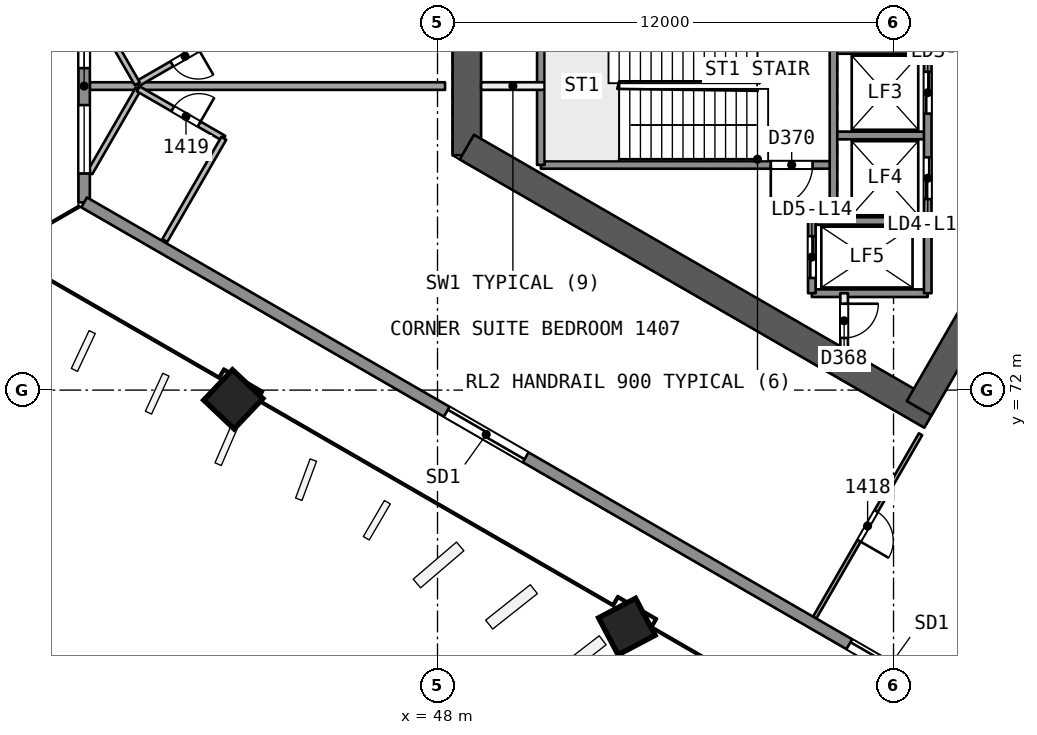
"""IFC4 building model, lengths in metres.
Left out: names, types, materials, properties, quantities, classifications, styles, units other than length and angle.
Written with IfcOpenShell. Run it as: python <this file> out.ifc"""

import sys

from ifc_helpers import new_model, si_unit, direction, frame, frame_2d, origin, origin_2d, place, context, subcontext, project, spatial, rectangle, extrude, element, fill, save


model = new_model("IFC4")
c1 = context("Model", 3, precision=1e-05, world=origin(), true_north=direction((0.0, 1.0)))
c2 = subcontext(c1, "Body", "Model", "MODEL_VIEW")
j1 = project(units=[si_unit("LENGTHUNIT", "METRE"), si_unit("PLANEANGLEUNIT", "RADIAN")], contexts=[c1])
p1 = place(None, origin())
s1 = spatial("IfcSite", under=j1, at=p1, CompositionType="ELEMENT")
p2 = place(p1, origin())
s2 = spatial("IfcBuilding", under=s1, at=p2, CompositionType="ELEMENT")
p3 = place(p2, frame((0.0, 0.0, 64.7)))
s3 = spatial("IfcBuildingStorey", under=s2, at=p3, CompositionType="ELEMENT", Elevation=64.7)
p4 = place(p3, frame((65.567, 80.0, 0.0), z_axis=(0.0, 0.0, 1.0), x_axis=(-0.499988615364, 0.866031976607, 0.0)))
e1 = element("IfcWall", 1, at=p4, inside=s3, PredefinedType="SHEAR", context=c2, shape_type="SweptSolid", body=[
    extrude(rectangle(XDim=10.163, YDim=0.75, at=frame_2d((5.082, 0.0))), origin(), (0.0, 0.0, 1.0), 3.7),
])
p5 = place(p4, frame((0.733, 0.0, 0.0)))
e2 = element("IfcOpeningElement", 2, at=p5, cuts=e1, PredefinedType="OPENING", context=c2, shape_type="SweptSolid", body=[
    extrude(rectangle(XDim=1.2, YDim=2.1, at=frame_2d((0.6, 1.05))), frame((0.0, 0.385, 0.0), z_axis=(0.0, -1.0, 0.0), x_axis=(1.0, 0.0, 0.0)), (0.0, 0.0, 1.0), 0.771),
])
p6 = place(p3, frame((48.772, 81.606, 0.0), z_axis=(0.0, 0.0, 1.0), x_axis=(0.0, -1.0, 0.0)))
e3 = element("IfcWall", 3, at=p6, inside=s3, PredefinedType="SHEAR", context=c2, shape_type="SweptSolid", body=[
    extrude(rectangle(XDim=3.429, YDim=0.75, at=frame_2d((1.714, 0.0))), origin(), (0.0, 0.0, 1.0), 3.7),
])
p7 = place(p3, frame((48.772, 78.394, 0.0), z_axis=(0.0, 0.0, 1.0), x_axis=(0.866028339916, -0.499994914436, 0.0)))
e4 = element("IfcWall", 4, at=p7, inside=s3, PredefinedType="SHEAR", context=c2, shape_type="SweptSolid", body=[
    extrude(rectangle(XDim=14.117, YDim=0.75, at=frame_2d((7.059, 0.0))), origin(), (0.0, 0.0, 1.0), 3.7),
])
p8 = place(p3, frame((60.673, 71.523, 0.0), z_axis=(0.0, 0.0, 1.0), x_axis=(0.499997052475, 0.866027105532, 0.0)))
e5 = element("IfcWall", 5, at=p8, inside=s3, PredefinedType="SHEAR", context=c2, shape_type="SweptSolid", body=[
    extrude(rectangle(XDim=10.005, YDim=0.75, at=frame_2d((5.002, 0.0))), origin(), (0.0, 0.0, 1.0), 3.7),
])
p9 = place(p8, frame((7.855, 0.0, 0.0)))
e6 = element("IfcOpeningElement", 6, at=p9, cuts=e5, PredefinedType="OPENING", context=c2, shape_type="SweptSolid", body=[
    extrude(rectangle(XDim=1.2, YDim=2.1, at=frame_2d((0.6, 1.05))), frame((0.0, 0.385, 0.0), z_axis=(0.0, -1.0, 0.0), x_axis=(1.0, 0.0, 0.0)), (0.0, 0.0, 1.0), 0.771),
])
p10 = place(p3, frame((42.593, 71.749, 0.0), z_axis=(0.02855911485, 0.006793507689, 0.999569019734), x_axis=(-0.865319840559, 0.500766443848, 0.021319996519)))
e7 = element("IfcColumn", 7, at=p10, inside=s3, PredefinedType="COLUMN", context=c2, shape_type="SweptSolid", body=[
    extrude(rectangle(XDim=1.1, YDim=1.1, at=origin_2d()), origin(), (0.0, 0.0, 1.0), 3.702),
])
p11 = place(p3, frame((52.959, 65.764, 0.0), z_axis=(0.019328501455, 0.012204002625, 0.999738701537), x_axis=(-0.866906106124, 0.498357109285, 0.010676834304)))
e8 = element("IfcColumn", 8, at=p11, inside=s3, PredefinedType="COLUMN", context=c2, shape_type="SweptSolid", body=[
    extrude(rectangle(XDim=1.1, YDim=1.1, at=origin_2d()), origin(), (0.0, 0.0, 1.0), 3.701),
])
p12 = place(p3, frame((42.352, 81.36, 0.0), z_axis=(0.0, 0.0, 1.0), x_axis=(-0.865997922154, -0.500047596559, 0.0)))
e9 = element("IfcWall", 9, at=p12, inside=s3, PredefinedType="PARTITIONING", context=c2, shape_type="SweptSolid", body=[
    extrude(rectangle(XDim=2.6, YDim=0.15, at=frame_2d((1.3, 0.0))), origin(), (0.0, 0.0, 1.0), 3.2),
])
p13 = place(p12, frame((0.75, 0.0, 0.0)))
e10 = element("IfcOpeningElement", 10, at=p13, cuts=e9, PredefinedType="OPENING", context=c2, shape_type="SweptSolid", body=[
    extrude(rectangle(XDim=0.8, YDim=2.1, at=frame_2d((0.4, 1.05))), frame((0.0, 0.085, 0.0), z_axis=(0.0, -1.0, 0.0), x_axis=(1.0, 0.0, 0.0)), (0.0, 0.0, 1.0), 0.171),
])
p14 = place(p3, frame((40.1, 80.06, 0.0), z_axis=(0.0, 0.0, 1.0), x_axis=(-0.499973274517, 0.866040833199, 0.0)))
e11 = element("IfcWall", 11, at=p14, inside=s3, PredefinedType="PARTITIONING", context=c2, shape_type="SweptSolid", body=[
    extrude(rectangle(XDim=2.5, YDim=0.15, at=frame_2d((1.25, 0.0))), origin(), (0.0, 0.0, 1.0), 3.2),
])
p15 = place(p3, frame((38.851, 80.0, 0.0), z_axis=(0.0, 0.0, 1.0), x_axis=(1.0, 0.0, 0.0)))
e12 = element("IfcWall", 12, at=p15, inside=s3, PredefinedType="PARTITIONING", context=c2, shape_type="SweptSolid", body=[
    extrude(rectangle(XDim=9.347, YDim=0.2, at=frame_2d((4.674, 0.0))), origin(), (0.0, 0.0, 1.0), 3.2),
])
p16 = place(p3, frame((60.71, 70.838, 0.0), z_axis=(0.0, 0.0, 1.0), x_axis=(-0.499994302092, -0.866028693448, 0.0)))
e13 = element("IfcWall", 13, at=p16, inside=s3, PredefinedType="PARTITIONING", context=c2, shape_type="SweptSolid", body=[
    extrude(rectangle(XDim=5.571, YDim=0.1, at=frame_2d((2.786, 0.0))), origin(), (0.0, 0.0, 1.0), 3.2),
])
p17 = place(p16, frame((2.336, 0.0, 0.0)))
e14 = element("IfcOpeningElement", 14, at=p17, cuts=e13, PredefinedType="OPENING", context=c2, shape_type="SweptSolid", body=[
    extrude(rectangle(XDim=0.9, YDim=2.1, at=frame_2d((0.45, 1.05))), frame((0.0, 0.061, 0.0), z_axis=(0.0, -1.0, 0.0), x_axis=(1.0, 0.0, 0.0)), (0.0, 0.0, 1.0), 0.121),
])
p18 = place(p3, frame((38.851, 77.718, 0.0), z_axis=(0.0, 0.0, 1.0), x_axis=(0.499960079661, 0.866048450576, 0.0)))
e15 = element("IfcWall", 15, at=p18, inside=s3, PredefinedType="PARTITIONING", context=c2, shape_type="SweptSolid", body=[
    extrude(rectangle(XDim=2.55, YDim=0.15, at=frame_2d((1.275, 0.0))), origin(), (0.0, 0.0, 1.0), 3.2),
])
p19 = place(p3, frame((40.125, 79.926, 0.0), z_axis=(0.0, 0.0, 1.0), x_axis=(0.866062058628, -0.499936506574, 0.0)))
e16 = element("IfcWall", 16, at=p19, inside=s3, PredefinedType="PARTITIONING", context=c2, shape_type="SweptSolid", body=[
    extrude(rectangle(XDim=2.6, YDim=0.15, at=frame_2d((1.3, 0.0))), origin(), (0.0, 0.0, 1.0), 3.2),
])
p20 = place(p19, frame((1.05, 0.0, 0.0)))
e17 = element("IfcOpeningElement", 17, at=p20, cuts=e16, PredefinedType="OPENING", context=c2, shape_type="SweptSolid", body=[
    extrude(rectangle(XDim=0.8, YDim=2.1, at=frame_2d((0.4, 1.05))), frame((0.0, 0.085, 0.0), z_axis=(0.0, -1.0, 0.0), x_axis=(1.0, 0.0, 0.0)), (0.0, 0.0, 1.0), 0.171),
])
p21 = place(p3, frame((42.377, 78.626, 0.0), z_axis=(0.0, 0.0, 1.0), x_axis=(-0.499983108224, -0.866035156036, 0.0)))
e18 = element("IfcWall", 18, at=p21, inside=s3, PredefinedType="PARTITIONING", context=c2, shape_type="SweptSolid", body=[
    extrude(rectangle(XDim=3.108, YDim=0.15, at=frame_2d((1.554, 0.0))), origin(), (0.0, 0.0, 1.0), 3.2),
])
p22 = place(p3, frame((38.701, 76.94, 0.0), z_axis=(0.0, 0.0, 1.0), x_axis=(0.0, 1.0, 0.0)))
e19 = element("IfcWall", 19, at=p22, inside=s3, PredefinedType="SOLIDWALL", context=c2, shape_type="SweptSolid", body=[
    extrude(rectangle(XDim=6.121, YDim=0.3, at=frame_2d((3.06, 0.0))), origin(), (0.0, 0.0, 1.0), 3.2),
])
p23 = place(p22, frame((3.532, 0.0, 0.9)))
e20 = element("IfcOpeningElement", 20, at=p23, cuts=e19, PredefinedType="OPENING", context=c2, shape_type="SweptSolid", body=[
    extrude(rectangle(XDim=1.8, YDim=1.5, at=frame_2d((0.9, 0.75))), frame((0.0, 0.161, 0.0), z_axis=(0.0, -1.0, 0.0), x_axis=(1.0, 0.0, 0.0)), (0.0, 0.0, 1.0), 0.321),
])
p24 = place(p22, frame((0.76, 0.0, 0.9)))
e21 = element("IfcOpeningElement", 21, at=p24, cuts=e19, PredefinedType="OPENING", context=c2, shape_type="SweptSolid", body=[
    extrude(rectangle(XDim=1.8, YDim=1.5, at=frame_2d((0.9, 0.75))), frame((0.0, 0.161, 0.0), z_axis=(0.0, -1.0, 0.0), x_axis=(1.0, 0.0, 0.0)), (0.0, 0.0, 1.0), 0.321),
])
p25 = place(p3, frame((90.499, 47.034, 0.0), z_axis=(0.0, 0.0, 1.0), x_axis=(-0.866026049211, 0.499998882086, 0.0)))
e22 = element("IfcWall", 22, at=p25, inside=s3, PredefinedType="SOLIDWALL", context=c2, shape_type="SweptSolid", body=[
    extrude(rectangle(XDim=59.811, YDim=0.3, at=frame_2d((29.905, 0.0))), origin(), (0.0, 0.0, 1.0), 3.2),
])
p26 = place(p25, frame((28.705, 0.0, 0.0)))
e23 = element("IfcOpeningElement", 23, at=p26, cuts=e22, PredefinedType="OPENING", context=c2, shape_type="SweptSolid", body=[
    extrude(rectangle(XDim=2.4, YDim=2.4, at=frame_2d((1.2, 1.2))), frame((0.0, 0.161, 0.0), z_axis=(0.0, -1.0, 0.0), x_axis=(1.0, 0.0, 0.0)), (0.0, 0.0, 1.0), 0.321),
])
p27 = place(p25, frame((34.161, 0.0, 0.0)))
e24 = element("IfcOpeningElement", 24, at=p27, cuts=e22, PredefinedType="OPENING", context=c2, shape_type="SweptSolid", body=[
    extrude(rectangle(XDim=2.4, YDim=2.4, at=frame_2d((1.2, 1.2))), frame((0.0, 0.161, 0.0), z_axis=(0.0, -1.0, 0.0), x_axis=(1.0, 0.0, 0.0)), (0.0, 0.0, 1.0), 0.321),
])
p28 = place(p25, frame((46.394, 0.0, 0.0)))
e25 = element("IfcOpeningElement", 25, at=p28, cuts=e22, PredefinedType="OPENING", context=c2, shape_type="SweptSolid", body=[
    extrude(rectangle(XDim=2.4, YDim=2.4, at=frame_2d((1.2, 1.2))), frame((0.0, 0.161, 0.0), z_axis=(0.0, -1.0, 0.0), x_axis=(1.0, 0.0, 0.0)), (0.0, 0.0, 1.0), 0.321),
])
p29 = place(p25, frame((23.249, 0.0, 0.0)))
e26 = element("IfcOpeningElement", 26, at=p29, cuts=e22, PredefinedType="OPENING", context=c2, shape_type="SweptSolid", body=[
    extrude(rectangle(XDim=2.4, YDim=2.4, at=frame_2d((1.2, 1.2))), frame((0.0, 0.161, 0.0), z_axis=(0.0, -1.0, 0.0), x_axis=(1.0, 0.0, 0.0)), (0.0, 0.0, 1.0), 0.321),
])
p30 = place(p25, frame((11.002, 0.0, 0.0)))
e27 = element("IfcOpeningElement", 27, at=p30, cuts=e22, PredefinedType="OPENING", context=c2, shape_type="SweptSolid", body=[
    extrude(rectangle(XDim=2.4, YDim=2.4, at=frame_2d((1.2, 1.2))), frame((0.0, 0.161, 0.0), z_axis=(0.0, -1.0, 0.0), x_axis=(1.0, 0.0, 0.0)), (0.0, 0.0, 1.0), 0.321),
])
p31 = place(p3, frame((60.9, 80.95, 0.0), z_axis=(0.0, 0.0, 1.0), x_axis=(-1.0, 0.0, 0.0)))
e28 = element("IfcWall", 28, at=p31, inside=s3, PredefinedType="SOLIDWALL", context=c2, shape_type="SweptSolid", body=[
    extrude(rectangle(XDim=2.48, YDim=0.2, at=frame_2d((1.24, 0.0))), origin(), (0.0, 0.0, 1.0), 3.2),
])
p32 = place(p3, frame((50.82, 80.0, 0.0), z_axis=(0.0, 0.0, 1.0), x_axis=(-1.0, 0.0, 0.0)))
e29 = element("IfcWall", 29, at=p32, inside=s3, PredefinedType="PARTITIONING", context=c2, shape_type="SweptSolid", body=[
    extrude(rectangle(XDim=1.673, YDim=0.2, at=frame_2d((0.836, 0.0))), origin(), (0.0, 0.0, 1.0), 3.2),
])
p33 = place(p3, frame((60.9, 78.7, 0.0), z_axis=(0.0, 0.0, 1.0), x_axis=(-1.0, 0.0, 0.0)))
e30 = element("IfcWall", 30, at=p33, inside=s3, PredefinedType="SOLIDWALL", context=c2, shape_type="SweptSolid", body=[
    extrude(rectangle(XDim=2.48, YDim=0.2, at=frame_2d((1.24, 0.0))), origin(), (0.0, 0.0, 1.0), 3.2),
])
p34 = place(p3, frame((58.42, 77.925, 0.0), z_axis=(0.0, 0.0, 1.0), x_axis=(-1.0, 0.0, 0.0)))
e31 = element("IfcWall", 31, at=p34, inside=s3, PredefinedType="SOLIDWALL", context=c2, shape_type="SweptSolid", body=[
    extrude(rectangle(XDim=7.7, YDim=0.2, at=frame_2d((3.85, 0.0))), origin(), (0.0, 0.0, 1.0), 3.2),
])
p35 = place(p34, frame((0.55, 0.0, 0.0)))
e32 = element("IfcOpeningElement", 32, at=p35, cuts=e31, PredefinedType="OPENING", context=c2, shape_type="SweptSolid", body=[
    extrude(rectangle(XDim=1.1, YDim=2.1, at=frame_2d((0.55, 1.05))), frame((0.0, 0.11, 0.0), z_axis=(0.0, -1.0, 0.0), x_axis=(1.0, 0.0, 0.0)), (0.0, 0.0, 1.0), 0.221),
])
for number, where, z_axis, x_axis in (
    (33, (60.9, 76.45, 0.0), (0.0, 0.0, 1.0), (-1.0, 0.0, 0.0)),
    (34, (60.9, 74.55, 0.0), (0.0, 0.0, 1.0), (-1.0, 0.0, 0.0)),
):
    element("IfcWall", number, at=place(p3, frame(where, z_axis=z_axis, x_axis=x_axis)), inside=s3, PredefinedType="SOLIDWALL", context=c2, shape_type="SweptSolid", body=[
        extrude(rectangle(XDim=3.05, YDim=0.2, at=frame_2d((1.525, 0.0))), origin(), (0.0, 0.0, 1.0), 3.2),
    ])
p36 = place(p3, frame((60.9, 85.45, 0.0), z_axis=(0.0, 0.0, 1.0), x_axis=(0.0, -1.0, 0.0)))
e35 = element("IfcWall", 35, at=p36, inside=s3, PredefinedType="SOLIDWALL", context=c2, shape_type="SweptSolid", body=[
    extrude(rectangle(XDim=10.9, YDim=0.2, at=frame_2d((5.45, 0.0))), origin(), (0.0, 0.0, 1.0), 3.2),
])
p37 = place(p36, frame((0.575, 0.0, 0.0)))
e36 = element("IfcOpeningElement", 36, at=p37, cuts=e35, PredefinedType="OPENING", context=c2, shape_type="SweptSolid", body=[
    extrude(rectangle(XDim=1.1, YDim=2.1, at=frame_2d((0.55, 1.05))), frame((0.0, 0.11, 0.0), z_axis=(0.0, -1.0, 0.0), x_axis=(1.0, 0.0, 0.0)), (0.0, 0.0, 1.0), 0.221),
])
p38 = place(p36, frame((2.825, 0.0, 0.0)))
e37 = element("IfcOpeningElement", 37, at=p38, cuts=e35, PredefinedType="OPENING", context=c2, shape_type="SweptSolid", body=[
    extrude(rectangle(XDim=1.1, YDim=2.1, at=frame_2d((0.55, 1.05))), frame((0.0, 0.11, 0.0), z_axis=(0.0, -1.0, 0.0), x_axis=(1.0, 0.0, 0.0)), (0.0, 0.0, 1.0), 0.221),
])
p39 = place(p36, frame((5.075, 0.0, 0.0)))
e38 = element("IfcOpeningElement", 38, at=p39, cuts=e35, PredefinedType="OPENING", context=c2, shape_type="SweptSolid", body=[
    extrude(rectangle(XDim=1.1, YDim=2.1, at=frame_2d((0.55, 1.05))), frame((0.0, 0.11, 0.0), z_axis=(0.0, -1.0, 0.0), x_axis=(1.0, 0.0, 0.0)), (0.0, 0.0, 1.0), 0.221),
])
p40 = place(p36, frame((7.325, 0.0, 0.0)))
e39 = element("IfcOpeningElement", 39, at=p40, cuts=e35, PredefinedType="OPENING", context=c2, shape_type="SweptSolid", body=[
    extrude(rectangle(XDim=1.1, YDim=2.1, at=frame_2d((0.55, 1.05))), frame((0.0, 0.11, 0.0), z_axis=(0.0, -1.0, 0.0), x_axis=(1.0, 0.0, 0.0)), (0.0, 0.0, 1.0), 0.221),
])
p41 = place(p3, frame((58.7, 74.55, 0.0), z_axis=(0.0, 0.0, 1.0), x_axis=(0.0, -1.0, 0.0)))
e40 = element("IfcWall", 40, at=p41, inside=s3, PredefinedType="PARTITIONING", context=c2, shape_type="SweptSolid", body=[
    extrude(rectangle(XDim=1.455, YDim=0.2, at=frame_2d((0.728, 0.0))), origin(), (0.0, 0.0, 1.0), 3.2),
])
p42 = place(p41, frame((0.278, 0.0, 0.0)))
e41 = element("IfcOpeningElement", 41, at=p42, cuts=e40, PredefinedType="OPENING", context=c2, shape_type="SweptSolid", body=[
    extrude(rectangle(XDim=0.9, YDim=2.1, at=frame_2d((0.45, 1.05))), frame((0.0, 0.11, 0.0), z_axis=(0.0, -1.0, 0.0), x_axis=(1.0, 0.0, 0.0)), (0.0, 0.0, 1.0), 0.221),
])
p43 = place(p3, frame((58.42, 85.45, 0.0), z_axis=(0.0, 0.0, 1.0), x_axis=(0.0, -1.0, 0.0)))
e42 = element("IfcWall", 42, at=p43, inside=s3, PredefinedType="SOLIDWALL", context=c2, shape_type="SweptSolid", body=[
    extrude(rectangle(XDim=9.0, YDim=0.2, at=frame_2d((4.5, 0.0))), origin(), (0.0, 0.0, 1.0), 3.2),
])
p44 = place(p3, frame((57.85, 76.45, 0.0), z_axis=(0.0, 0.0, 1.0), x_axis=(0.0, -1.0, 0.0)))
e43 = element("IfcWall", 43, at=p44, inside=s3, PredefinedType="SOLIDWALL", context=c2, shape_type="SweptSolid", body=[
    extrude(rectangle(XDim=1.9, YDim=0.2, at=frame_2d((0.95, 0.0))), origin(), (0.0, 0.0, 1.0), 3.2),
])
p45 = place(p44, frame((0.4, 0.0, 0.0)))
e44 = element("IfcOpeningElement", 44, at=p45, cuts=e43, PredefinedType="OPENING", context=c2, shape_type="SweptSolid", body=[
    extrude(rectangle(XDim=1.1, YDim=2.1, at=frame_2d((0.55, 1.05))), frame((0.0, 0.11, 0.0), z_axis=(0.0, -1.0, 0.0), x_axis=(1.0, 0.0, 0.0)), (0.0, 0.0, 1.0), 0.221),
])
p46 = place(p3, frame((50.72, 82.075, 0.0), z_axis=(0.0, 0.0, 1.0), x_axis=(0.0, -1.0, 0.0)))
e45 = element("IfcWall", 45, at=p46, inside=s3, PredefinedType="SOLIDWALL", context=c2, shape_type="SweptSolid", body=[
    extrude(rectangle(XDim=4.15, YDim=0.2, at=frame_2d((2.075, 0.0))), origin(), (0.0, 0.0, 1.0), 3.2),
])
p47 = place(p13, origin())
e46 = element("IfcDoor", 46, at=p47, inside=s3, OperationType="SINGLE_SWING_LEFT", PredefinedType="NOTDEFINED", context=c2, shape_type="SweptSolid", body=[
    extrude(rectangle(XDim=0.8, YDim=2.1, at=frame_2d((0.4, 1.05))), frame((0.0, 0.025, 0.0), z_axis=(0.0, -1.0, 0.0), x_axis=(1.0, 0.0, 0.0)), (0.0, 0.0, 1.0), 0.05),
])
fill(e10, e46)
p48 = place(p17, origin())
e47 = element("IfcDoor", 47, at=p48, inside=s3, OperationType="SINGLE_SWING_RIGHT", PredefinedType="NOTDEFINED", context=c2, shape_type="SweptSolid", body=[
    extrude(rectangle(XDim=0.9, YDim=2.1, at=frame_2d((0.45, 1.05))), frame((0.0, 0.025, 0.0), z_axis=(0.0, -1.0, 0.0), x_axis=(1.0, 0.0, 0.0)), (0.0, 0.0, 1.0), 0.05),
])
fill(e14, e47)
p49 = place(p20, origin())
e48 = element("IfcDoor", 48, at=p49, inside=s3, OperationType="SINGLE_SWING_RIGHT", PredefinedType="NOTDEFINED", context=c2, shape_type="SweptSolid", body=[
    extrude(rectangle(XDim=0.8, YDim=2.1, at=frame_2d((0.4, 1.05))), frame((0.0, 0.025, 0.0), z_axis=(0.0, -1.0, 0.0), x_axis=(1.0, 0.0, 0.0)), (0.0, 0.0, 1.0), 0.05),
])
fill(e17, e48)
p50 = place(p23, origin())
e49 = element("IfcWindow", 49, at=p50, inside=s3, PartitioningType="SINGLE_PANEL", PredefinedType="WINDOW", context=c2, shape_type="SweptSolid", body=[
    extrude(rectangle(XDim=1.8, YDim=1.5, at=frame_2d((0.9, 0.75))), frame((0.0, 0.03, 0.0), z_axis=(0.0, -1.0, 0.0), x_axis=(1.0, 0.0, 0.0)), (0.0, 0.0, 1.0), 0.06),
])
fill(e20, e49)
p51 = place(p24, origin())
e50 = element("IfcWindow", 50, at=p51, inside=s3, PartitioningType="SINGLE_PANEL", PredefinedType="WINDOW", context=c2, shape_type="SweptSolid", body=[
    extrude(rectangle(XDim=1.8, YDim=1.5, at=frame_2d((0.9, 0.75))), frame((0.0, 0.03, 0.0), z_axis=(0.0, -1.0, 0.0), x_axis=(1.0, 0.0, 0.0)), (0.0, 0.0, 1.0), 0.06),
])
fill(e21, e50)
p52 = place(p27, origin())
e51 = element("IfcDoor", 51, at=p52, inside=s3, OperationType="SLIDING_TO_RIGHT", PredefinedType="NOTDEFINED", context=c2, shape_type="SweptSolid", body=[
    extrude(rectangle(XDim=2.4, YDim=2.4, at=frame_2d((1.2, 1.2))), frame((0.0, 0.025, 0.0), z_axis=(0.0, -1.0, 0.0), x_axis=(1.0, 0.0, 0.0)), (0.0, 0.0, 1.0), 0.05),
])
fill(e24, e51)
p53 = place(p28, origin())
e52 = element("IfcDoor", 52, at=p53, inside=s3, OperationType="SLIDING_TO_LEFT", PredefinedType="NOTDEFINED", context=c2, shape_type="SweptSolid", body=[
    extrude(rectangle(XDim=2.4, YDim=2.4, at=frame_2d((1.2, 1.2))), frame((0.0, 0.025, 0.0), z_axis=(0.0, -1.0, 0.0), x_axis=(1.0, 0.0, 0.0)), (0.0, 0.0, 1.0), 0.05),
])
fill(e25, e52)
p54 = place(p39, origin())
e53 = element("IfcDoor", 53, at=p54, inside=s3, OperationType="SLIDING_TO_RIGHT", PredefinedType="NOTDEFINED", context=c2, shape_type="SweptSolid", body=[
    extrude(rectangle(XDim=1.1, YDim=2.1, at=frame_2d((0.55, 1.05))), frame((0.0, 0.025, 0.0), z_axis=(0.0, -1.0, 0.0), x_axis=(1.0, 0.0, 0.0)), (0.0, 0.0, 1.0), 0.05),
])
fill(e38, e53)
p55 = place(p40, origin())
e54 = element("IfcDoor", 54, at=p55, inside=s3, OperationType="SLIDING_TO_LEFT", PredefinedType="NOTDEFINED", context=c2, shape_type="SweptSolid", body=[
    extrude(rectangle(XDim=1.1, YDim=2.1, at=frame_2d((0.55, 1.05))), frame((0.0, 0.025, 0.0), z_axis=(0.0, -1.0, 0.0), x_axis=(1.0, 0.0, 0.0)), (0.0, 0.0, 1.0), 0.05),
])
fill(e39, e54)
p56 = place(p45, origin())
e55 = element("IfcDoor", 55, at=p56, inside=s3, OperationType="SLIDING_TO_RIGHT", PredefinedType="NOTDEFINED", context=c2, shape_type="SweptSolid", body=[
    extrude(rectangle(XDim=1.1, YDim=2.1, at=frame_2d((0.55, 1.05))), frame((0.0, 0.025, 0.0), z_axis=(0.0, -1.0, 0.0), x_axis=(1.0, 0.0, 0.0)), (0.0, 0.0, 1.0), 0.05),
])
fill(e44, e55)
p57 = place(p42, origin())
e56 = element("IfcDoor", 56, at=p57, inside=s3, OperationType="SINGLE_SWING_LEFT", PredefinedType="NOTDEFINED", context=c2, shape_type="SweptSolid", body=[
    extrude(rectangle(XDim=0.9, YDim=2.1, at=frame_2d((0.45, 1.05))), frame((0.0, 0.025, 0.0), z_axis=(0.0, -1.0, 0.0), x_axis=(1.0, 0.0, 0.0)), (0.0, 0.0, 1.0), 0.05),
])
fill(e41, e56)
p58 = place(p35, origin())
e57 = element("IfcDoor", 57, at=p58, inside=s3, OperationType="SINGLE_SWING_RIGHT", PredefinedType="NOTDEFINED", context=c2, shape_type="SweptSolid", body=[
    extrude(rectangle(XDim=1.1, YDim=2.1, at=frame_2d((0.55, 1.05))), frame((0.0, 0.025, 0.0), z_axis=(0.0, -1.0, 0.0), x_axis=(1.0, 0.0, 0.0)), (0.0, 0.0, 1.0), 0.05),
])
fill(e32, e57)
save(model, sys.argv[1])
